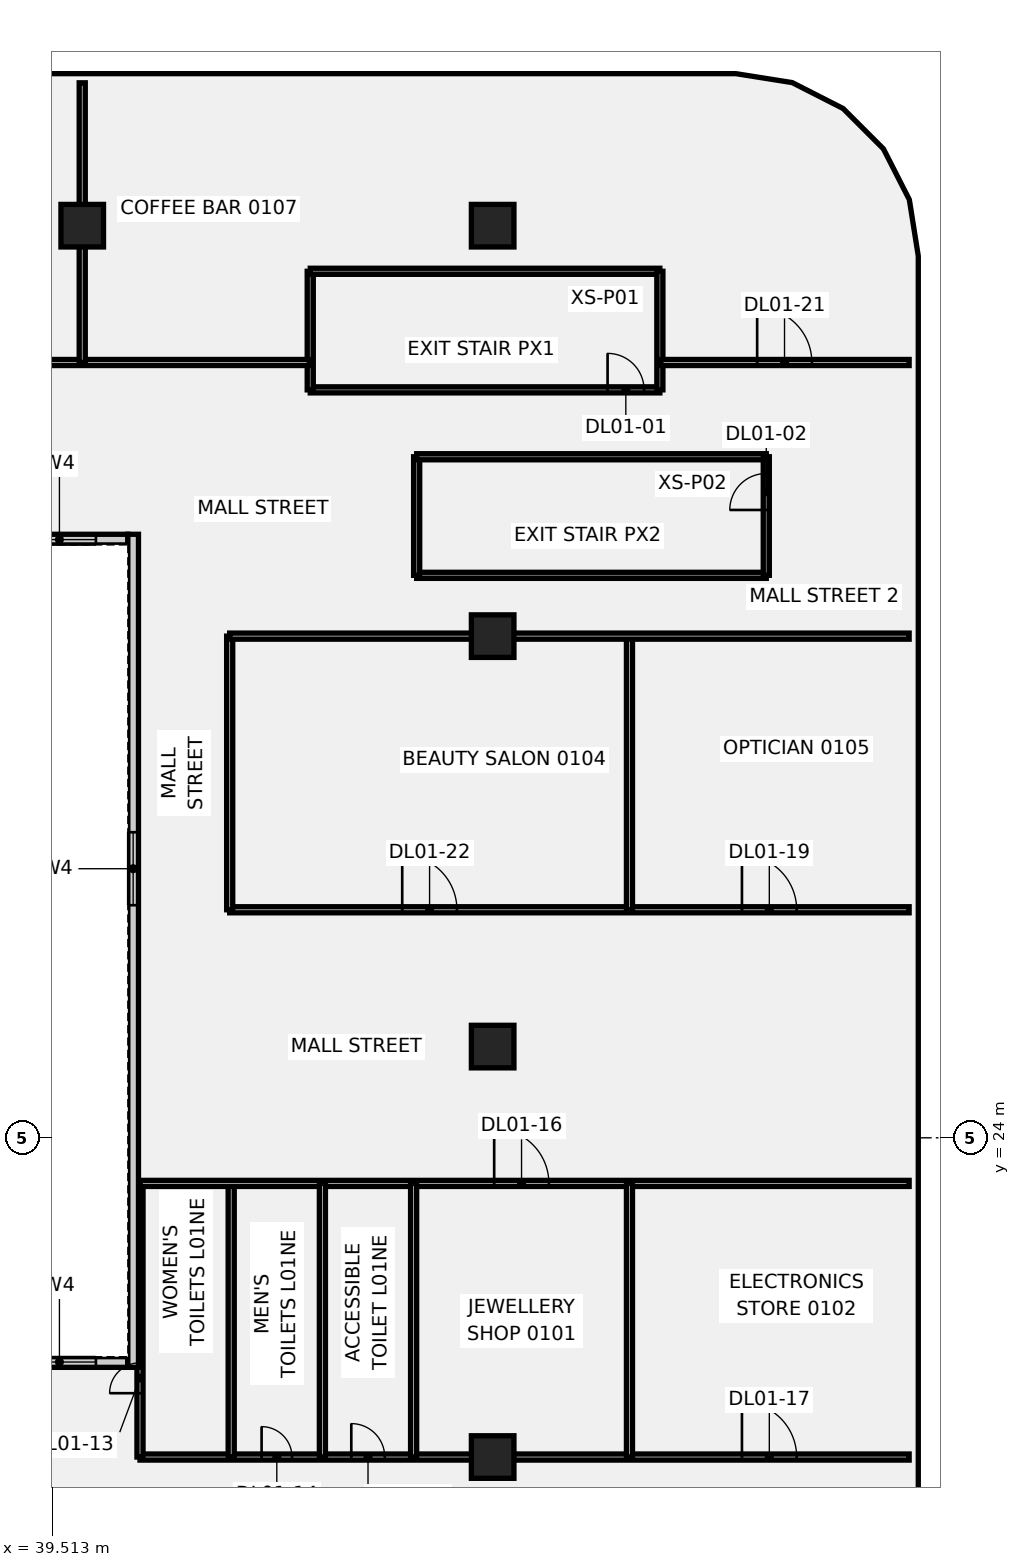
"""IFC4 building model, lengths in metres.
Left out: names, types, materials, properties, quantities, classifications, styles, units other than length and angle.
Written with IfcOpenShell. Run it as: python <this file> out.ifc"""

import sys

from ifc_helpers import new_model, si_unit, direction, frame, frame_2d, origin, origin_2d, place, context, subcontext, project, spatial, rectangle, extrude, element, fill, save


model = new_model("IFC4")
c1 = context("Model", 3, precision=1e-05, world=origin(), true_north=direction((0.0, 1.0)))
c2 = subcontext(c1, "Body", "Model", "MODEL_VIEW")
j1 = project(units=[si_unit("LENGTHUNIT", "METRE"), si_unit("PLANEANGLEUNIT", "RADIAN")], contexts=[c1])
p1 = place(None, origin())
s1 = spatial("IfcSite", under=j1, at=p1, CompositionType="ELEMENT")
p2 = place(p1, origin())
s2 = spatial("IfcBuilding", under=s1, at=p2, CompositionType="ELEMENT")
p3 = place(p2, frame((0.0, 0.0, 9.0)))
s3 = spatial("IfcBuildingStorey", under=s2, at=p3, CompositionType="ELEMENT", Elevation=9.0)
for number, where, z_axis, x_axis in (
    (1, (40.5, 54.0, -0.5), (0.0, 0.0, 1.0), (1.0, 0.0, 0.0)),
    (2, (54.0, 13.5, -0.5), (0.0, 0.0, 1.0), (1.0, 0.0, 0.0)),
    (3, (54.0, 27.0, -0.5), (0.0, 0.0, 1.0), (1.0, 0.0, 0.0)),
    (4, (54.0, 40.5, -0.5), (0.0, 0.0, 1.0), (1.0, 0.0, 0.0)),
    (5, (54.0, 54.0, -0.5), (0.0, 0.0, 1.0), (1.0, 0.0, 0.0)),
):
    element("IfcColumn", number, at=place(p3, frame(where, z_axis=z_axis, x_axis=x_axis)), inside=s3, PredefinedType="COLUMN", context=c2, shape_type="SweptSolid", body=[
        extrude(rectangle(XDim=1.4, YDim=1.4, at=origin_2d()), origin(), (0.0, 0.0, 1.0), 6.0),
    ])
p4 = place(p3, frame((48.0, 48.6, 0.0), z_axis=(0.0, 0.0, 1.0), x_axis=(1.0, 0.0, 0.0)))
e6 = element("IfcWall", 6, at=p4, inside=s3, PredefinedType="PARTITIONING", context=c2, shape_type="SweptSolid", body=[
    extrude(rectangle(XDim=11.5, YDim=0.2, at=frame_2d((5.75, 0.0))), origin(), (0.0, 0.0, 1.0), 5.5),
])
p5 = place(p4, frame((9.78, 0.0, 0.0)))
e7 = element("IfcOpeningElement", 7, at=p5, cuts=e6, PredefinedType="OPENING", context=c2, shape_type="SweptSolid", body=[
    extrude(rectangle(XDim=1.2, YDim=2.1, at=frame_2d((0.6, 1.05))), frame((0.0, 0.11, 0.0), z_axis=(0.0, -1.0, 0.0), x_axis=(1.0, 0.0, 0.0)), (0.0, 0.0, 1.0), 0.22),
])
p6 = place(p3, frame((48.0, 48.6, 0.0), z_axis=(0.0, 0.0, 1.0), x_axis=(0.0, 1.0, 0.0)))
e8 = element("IfcWall", 8, at=p6, inside=s3, PredefinedType="PARTITIONING", context=c2, shape_type="SweptSolid", body=[
    extrude(rectangle(XDim=3.9, YDim=0.2, at=frame_2d((1.95, 0.0))), origin(), (0.0, 0.0, 1.0), 5.5),
])
p7 = place(p3, frame((48.0, 52.5, 0.0), z_axis=(0.0, 0.0, 1.0), x_axis=(1.0, 0.0, 0.0)))
e9 = element("IfcWall", 9, at=p7, inside=s3, PredefinedType="PARTITIONING", context=c2, shape_type="SweptSolid", body=[
    extrude(rectangle(XDim=11.5, YDim=0.2, at=frame_2d((5.75, 0.0))), origin(), (0.0, 0.0, 1.0), 5.5),
])
p8 = place(p3, frame((59.5, 48.6, 0.0), z_axis=(0.0, 0.0, 1.0), x_axis=(0.0, 1.0, 0.0)))
e10 = element("IfcWall", 10, at=p8, inside=s3, PredefinedType="PARTITIONING", context=c2, shape_type="SweptSolid", body=[
    extrude(rectangle(XDim=3.9, YDim=0.2, at=frame_2d((1.95, 0.0))), origin(), (0.0, 0.0, 1.0), 5.5),
])
p9 = place(p3, frame((51.5, 42.5, 0.0), z_axis=(0.0, 0.0, 1.0), x_axis=(1.0, 0.0, 0.0)))
e11 = element("IfcWall", 11, at=p9, inside=s3, PredefinedType="PARTITIONING", context=c2, shape_type="SweptSolid", body=[
    extrude(rectangle(XDim=11.5, YDim=0.2, at=frame_2d((5.75, 0.0))), origin(), (0.0, 0.0, 1.0), 5.5),
])
p10 = place(p3, frame((51.5, 42.5, 0.0), z_axis=(0.0, 0.0, 1.0), x_axis=(0.0, 1.0, 0.0)))
e12 = element("IfcWall", 12, at=p10, inside=s3, PredefinedType="PARTITIONING", context=c2, shape_type="SweptSolid", body=[
    extrude(rectangle(XDim=3.9, YDim=0.2, at=frame_2d((1.95, 0.0))), origin(), (0.0, 0.0, 1.0), 5.5),
])
p11 = place(p3, frame((51.5, 46.4, 0.0), z_axis=(0.0, 0.0, 1.0), x_axis=(1.0, 0.0, 0.0)))
e13 = element("IfcWall", 13, at=p11, inside=s3, PredefinedType="PARTITIONING", context=c2, shape_type="SweptSolid", body=[
    extrude(rectangle(XDim=11.5, YDim=0.2, at=frame_2d((5.75, 0.0))), origin(), (0.0, 0.0, 1.0), 5.5),
])
p12 = place(p3, frame((63.0, 42.5, 0.0), z_axis=(0.0, 0.0, 1.0), x_axis=(0.0, 1.0, 0.0)))
e14 = element("IfcWall", 14, at=p12, inside=s3, PredefinedType="PARTITIONING", context=c2, shape_type="SweptSolid", body=[
    extrude(rectangle(XDim=3.9, YDim=0.2, at=frame_2d((1.95, 0.0))), origin(), (0.0, 0.0, 1.0), 5.5),
])
p13 = place(p12, frame((2.15, 0.0, 0.0)))
e15 = element("IfcOpeningElement", 15, at=p13, cuts=e14, PredefinedType="OPENING", context=c2, shape_type="SweptSolid", body=[
    extrude(rectangle(XDim=1.2, YDim=2.1, at=frame_2d((0.6, 1.05))), frame((0.0, 0.11, 0.0), z_axis=(0.0, -1.0, 0.0), x_axis=(1.0, 0.0, 0.0)), (0.0, 0.0, 1.0), 0.22),
])
p14 = place(p3, frame((19.53, 49.5, 0.0), z_axis=(0.0, 0.0, 1.0), x_axis=(1.0, 0.0, 0.0)))
e16 = element("IfcWall", 16, at=p14, inside=s3, PredefinedType="PARTITIONING", context=c2, shape_type="SweptSolid", body=[
    extrude(rectangle(XDim=28.44, YDim=0.2, at=frame_2d((14.22, 0.0))), origin(), (0.0, 0.0, 1.0), 5.5),
])
p15 = place(p14, frame((9.56, 0.0, 0.0)))
e17 = element("IfcOpeningElement", 17, at=p15, cuts=e16, PredefinedType="OPENING", context=c2, shape_type="SweptSolid", body=[
    extrude(rectangle(XDim=1.8, YDim=2.1, at=frame_2d((0.9, 1.05))), frame((0.0, 0.11, 0.0), z_axis=(0.0, -1.0, 0.0), x_axis=(1.0, 0.0, 0.0)), (0.0, 0.0, 1.0), 0.22),
])
p16 = place(p3, frame((40.5, 49.5, 0.0), z_axis=(0.0, 0.0, 1.0), x_axis=(0.0, 1.0, 0.0)))
e18 = element("IfcWall", 18, at=p16, inside=s3, PredefinedType="PARTITIONING", context=c2, shape_type="SweptSolid", body=[
    extrude(rectangle(XDim=9.199, YDim=0.2, at=frame_2d((4.6, 0.0))), origin(), (0.0, 0.0, 1.0), 5.5),
])
p17 = place(p3, frame((42.4, 13.5, 0.0), z_axis=(0.0, 0.0, 1.0), x_axis=(1.0, 0.0, 0.0)))
e19 = element("IfcWall", 19, at=p17, inside=s3, PredefinedType="PARTITIONING", context=c2, shape_type="SweptSolid", body=[
    extrude(rectangle(XDim=25.299, YDim=0.2, at=frame_2d((12.649, 0.0))), origin(), (0.0, 0.0, 1.0), 5.5),
])
p18 = place(p17, frame((4.0, 0.0, 0.0)))
e20 = element("IfcOpeningElement", 20, at=p18, cuts=e19, PredefinedType="OPENING", context=c2, shape_type="SweptSolid", body=[
    extrude(rectangle(XDim=1.0, YDim=2.1, at=frame_2d((0.5, 1.05))), frame((0.0, 0.11, 0.0), z_axis=(0.0, -1.0, 0.0), x_axis=(1.0, 0.0, 0.0)), (0.0, 0.0, 1.0), 0.22),
])
p19 = place(p17, frame((6.95, 0.0, 0.0)))
e21 = element("IfcOpeningElement", 21, at=p19, cuts=e19, PredefinedType="OPENING", context=c2, shape_type="SweptSolid", body=[
    extrude(rectangle(XDim=1.1, YDim=2.1, at=frame_2d((0.55, 1.05))), frame((0.0, 0.11, 0.0), z_axis=(0.0, -1.0, 0.0), x_axis=(1.0, 0.0, 0.0)), (0.0, 0.0, 1.0), 0.22),
])
p20 = place(p17, frame((19.8, 0.0, 0.0)))
e22 = element("IfcOpeningElement", 22, at=p20, cuts=e19, PredefinedType="OPENING", context=c2, shape_type="SweptSolid", body=[
    extrude(rectangle(XDim=1.8, YDim=2.1, at=frame_2d((0.9, 1.05))), frame((0.0, 0.11, 0.0), z_axis=(0.0, -1.0, 0.0), x_axis=(1.0, 0.0, 0.0)), (0.0, 0.0, 1.0), 0.22),
])
p21 = place(p3, frame((45.4, 13.5, 0.0), z_axis=(0.0, 0.0, 1.0), x_axis=(0.0, 1.0, 0.0)))
e23 = element("IfcWall", 23, at=p21, inside=s3, PredefinedType="PARTITIONING", context=c2, shape_type="SweptSolid", body=[
    extrude(rectangle(XDim=9.0, YDim=0.2, at=frame_2d((4.5, 0.0))), origin(), (0.0, 0.0, 1.0), 5.5),
])
p22 = place(p3, frame((42.4, 13.5, 0.0), z_axis=(0.0, 0.0, 1.0), x_axis=(0.0, 1.0, 0.0)))
e24 = element("IfcWall", 24, at=p22, inside=s3, PredefinedType="PARTITIONING", context=c2, shape_type="SweptSolid", body=[
    extrude(rectangle(XDim=9.0, YDim=0.2, at=frame_2d((4.5, 0.0))), origin(), (0.0, 0.0, 1.0), 5.5),
])
p23 = place(p22, frame((2.1, 0.0, 0.0)))
e25 = element("IfcOpeningElement", 25, at=p23, cuts=e24, PredefinedType="OPENING", context=c2, shape_type="SweptSolid", body=[
    extrude(rectangle(XDim=1.0, YDim=2.1, at=frame_2d((0.5, 1.05))), frame((0.0, 0.11, 0.0), z_axis=(0.0, -1.0, 0.0), x_axis=(1.0, 0.0, 0.0)), (0.0, 0.0, 1.0), 0.22),
])
p24 = place(p3, frame((42.4, 22.5, 0.0), z_axis=(0.0, 0.0, 1.0), x_axis=(1.0, 0.0, 0.0)))
e26 = element("IfcWall", 26, at=p24, inside=s3, PredefinedType="PARTITIONING", context=c2, shape_type="SweptSolid", body=[
    extrude(rectangle(XDim=25.299, YDim=0.2, at=frame_2d((12.649, 0.0))), origin(), (0.0, 0.0, 1.0), 5.5),
])
p25 = place(p24, frame((11.65, 0.0, 0.0)))
e27 = element("IfcOpeningElement", 27, at=p25, cuts=e26, PredefinedType="OPENING", context=c2, shape_type="SweptSolid", body=[
    extrude(rectangle(XDim=1.8, YDim=2.1, at=frame_2d((0.9, 1.05))), frame((0.0, 0.11, 0.0), z_axis=(0.0, -1.0, 0.0), x_axis=(1.0, 0.0, 0.0)), (0.0, 0.0, 1.0), 0.22),
])
for number, where, z_axis, x_axis in (
    (28, (48.4, 13.5, 0.0), (0.0, 0.0, 1.0), (0.0, 1.0, 0.0)),
    (29, (51.4, 13.5, 0.0), (0.0, 0.0, 1.0), (0.0, 1.0, 0.0)),
    (30, (58.5, 13.5, 0.0), (0.0, 0.0, 1.0), (0.0, 1.0, 0.0)),
):
    element("IfcWall", number, at=place(p3, frame(where, z_axis=z_axis, x_axis=x_axis)), inside=s3, PredefinedType="PARTITIONING", context=c2, shape_type="SweptSolid", body=[
        extrude(rectangle(XDim=9.0, YDim=0.2, at=frame_2d((4.5, 0.0))), origin(), (0.0, 0.0, 1.0), 5.5),
    ])
p26 = place(p3, frame((45.35, 31.5, 0.0), z_axis=(0.0, 0.0, 1.0), x_axis=(1.0, 0.0, 0.0)))
e31 = element("IfcWall", 31, at=p26, inside=s3, PredefinedType="PARTITIONING", context=c2, shape_type="SweptSolid", body=[
    extrude(rectangle(XDim=22.349, YDim=0.2, at=frame_2d((11.174, 0.0))), origin(), (0.0, 0.0, 1.0), 5.5),
])
p27 = place(p26, frame((16.85, 0.0, 0.0)))
e32 = element("IfcOpeningElement", 32, at=p27, cuts=e31, PredefinedType="OPENING", context=c2, shape_type="SweptSolid", body=[
    extrude(rectangle(XDim=1.8, YDim=2.1, at=frame_2d((0.9, 1.05))), frame((0.0, 0.11, 0.0), z_axis=(0.0, -1.0, 0.0), x_axis=(1.0, 0.0, 0.0)), (0.0, 0.0, 1.0), 0.22),
])
p28 = place(p26, frame((5.675, 0.0, 0.0)))
e33 = element("IfcOpeningElement", 33, at=p28, cuts=e31, PredefinedType="OPENING", context=c2, shape_type="SweptSolid", body=[
    extrude(rectangle(XDim=1.8, YDim=2.1, at=frame_2d((0.9, 1.05))), frame((0.0, 0.11, 0.0), z_axis=(0.0, -1.0, 0.0), x_axis=(1.0, 0.0, 0.0)), (0.0, 0.0, 1.0), 0.22),
])
for number, where, z_axis, x_axis in (
    (34, (58.5, 31.5, 0.0), (0.0, 0.0, 1.0), (0.0, 1.0, 0.0)),
    (35, (45.35, 31.5, 0.0), (0.0, 0.0, 1.0), (0.0, 1.0, 0.0)),
):
    element("IfcWall", number, at=place(p3, frame(where, z_axis=z_axis, x_axis=x_axis)), inside=s3, PredefinedType="PARTITIONING", context=c2, shape_type="SweptSolid", body=[
        extrude(rectangle(XDim=9.0, YDim=0.2, at=frame_2d((4.5, 0.0))), origin(), (0.0, 0.0, 1.0), 5.5),
    ])
p29 = place(p3, frame((45.35, 40.5, 0.0), z_axis=(0.0, 0.0, 1.0), x_axis=(1.0, 0.0, 0.0)))
e36 = element("IfcWall", 36, at=p29, inside=s3, PredefinedType="PARTITIONING", context=c2, shape_type="SweptSolid", body=[
    extrude(rectangle(XDim=22.349, YDim=0.2, at=frame_2d((11.174, 0.0))), origin(), (0.0, 0.0, 1.0), 5.5),
])
p30 = place(p3, frame((59.53, 49.5, 0.0), z_axis=(0.0, 0.0, 1.0), x_axis=(1.0, 0.0, 0.0)))
e37 = element("IfcWall", 37, at=p30, inside=s3, PredefinedType="PARTITIONING", context=c2, shape_type="SweptSolid", body=[
    extrude(rectangle(XDim=8.169, YDim=0.2, at=frame_2d((4.084, 0.0))), origin(), (0.0, 0.0, 1.0), 5.5),
])
p31 = place(p30, frame((3.17, 0.0, 0.0)))
e38 = element("IfcOpeningElement", 38, at=p31, cuts=e37, PredefinedType="OPENING", context=c2, shape_type="SweptSolid", body=[
    extrude(rectangle(XDim=1.8, YDim=2.1, at=frame_2d((0.9, 1.05))), frame((0.0, 0.11, 0.0), z_axis=(0.0, -1.0, 0.0), x_axis=(1.0, 0.0, 0.0)), (0.0, 0.0, 1.0), 0.22),
])
p32 = place(p3, frame((24.0, 16.625, 0.0), z_axis=(0.0, 0.0, 1.0), x_axis=(1.0, 0.0, 0.0)))
e39 = element("IfcWall", 39, at=p32, inside=s3, PredefinedType="SOLIDWALL", context=c2, shape_type="SweptSolid", body=[
    extrude(rectangle(XDim=18.0, YDim=0.35, at=frame_2d((9.0, 0.0))), origin(), (0.0, 0.0, 1.0), 5.5),
])
p33 = place(p32, frame((14.55, 0.0, 1.0)))
e40 = element("IfcOpeningElement", 40, at=p33, cuts=e39, PredefinedType="OPENING", context=c2, shape_type="SweptSolid", body=[
    extrude(rectangle(XDim=2.4, YDim=1.8, at=frame_2d((1.2, 0.9))), frame((0.0, 0.185, 0.0), z_axis=(0.0, -1.0, 0.0), x_axis=(1.0, 0.0, 0.0)), (0.0, 0.0, 1.0), 0.37),
])
p34 = place(p3, frame((24.0, 43.675, 0.0), z_axis=(0.0, 0.0, 1.0), x_axis=(1.0, 0.0, 0.0)))
e41 = element("IfcWall", 41, at=p34, inside=s3, PredefinedType="SOLIDWALL", context=c2, shape_type="SweptSolid", body=[
    extrude(rectangle(XDim=18.0, YDim=0.35, at=frame_2d((9.0, 0.0))), origin(), (0.0, 0.0, 1.0), 5.5),
])
p35 = place(p34, frame((14.55, 0.0, 1.0)))
e42 = element("IfcOpeningElement", 42, at=p35, cuts=e41, PredefinedType="OPENING", context=c2, shape_type="SweptSolid", body=[
    extrude(rectangle(XDim=2.4, YDim=1.8, at=frame_2d((1.2, 0.9))), frame((0.0, 0.185, 0.0), z_axis=(0.0, -1.0, 0.0), x_axis=(1.0, 0.0, 0.0)), (0.0, 0.0, 1.0), 0.37),
])
p36 = place(p3, frame((42.175, 16.45, 0.0), z_axis=(0.0, 0.0, 1.0), x_axis=(0.0, 1.0, 0.0)))
e43 = element("IfcWall", 43, at=p36, inside=s3, PredefinedType="SOLIDWALL", context=c2, shape_type="SweptSolid", body=[
    extrude(rectangle(XDim=27.4, YDim=0.35, at=frame_2d((13.7, 0.0))), origin(), (0.0, 0.0, 1.0), 5.5),
])
p37 = place(p36, frame((15.2, 0.0, 1.0)))
e44 = element("IfcOpeningElement", 44, at=p37, cuts=e43, PredefinedType="OPENING", context=c2, shape_type="SweptSolid", body=[
    extrude(rectangle(XDim=2.4, YDim=1.8, at=frame_2d((1.2, 0.9))), frame((0.0, 0.185, 0.0), z_axis=(0.0, -1.0, 0.0), x_axis=(1.0, 0.0, 0.0)), (0.0, 0.0, 1.0), 0.37),
])
p38 = place(p5, origin())
e45 = element("IfcDoor", 45, at=p38, inside=s3, OperationType="SINGLE_SWING_LEFT", PredefinedType="DOOR", context=c2, shape_type="SweptSolid", body=[
    extrude(rectangle(XDim=1.2, YDim=2.1, at=frame_2d((0.6, 1.05))), frame((0.0, 0.025, 0.0), z_axis=(0.0, -1.0, 0.0), x_axis=(1.0, 0.0, 0.0)), (0.0, 0.0, 1.0), 0.05),
])
fill(e7, e45)
p39 = place(p13, origin())
e46 = element("IfcDoor", 46, at=p39, inside=s3, OperationType="SINGLE_SWING_RIGHT", PredefinedType="DOOR", context=c2, shape_type="SweptSolid", body=[
    extrude(rectangle(XDim=1.2, YDim=2.1, at=frame_2d((0.6, 1.05))), frame((0.0, 0.025, 0.0), z_axis=(0.0, -1.0, 0.0), x_axis=(1.0, 0.0, 0.0)), (0.0, 0.0, 1.0), 0.05),
])
fill(e15, e46)
p40 = place(p23, origin())
e47 = element("IfcDoor", 47, at=p40, inside=s3, OperationType="SINGLE_SWING_LEFT", PredefinedType="DOOR", context=c2, shape_type="SweptSolid", body=[
    extrude(rectangle(XDim=1.0, YDim=2.1, at=frame_2d((0.5, 1.05))), frame((0.0, 0.025, 0.0), z_axis=(0.0, -1.0, 0.0), x_axis=(1.0, 0.0, 0.0)), (0.0, 0.0, 1.0), 0.05),
])
fill(e25, e47)
p41 = place(p18, origin())
e48 = element("IfcDoor", 48, at=p41, inside=s3, OperationType="SINGLE_SWING_RIGHT", PredefinedType="DOOR", context=c2, shape_type="SweptSolid", body=[
    extrude(rectangle(XDim=1.0, YDim=2.1, at=frame_2d((0.5, 1.05))), frame((0.0, 0.025, 0.0), z_axis=(0.0, -1.0, 0.0), x_axis=(1.0, 0.0, 0.0)), (0.0, 0.0, 1.0), 0.05),
])
fill(e20, e48)
p42 = place(p19, origin())
e49 = element("IfcDoor", 49, at=p42, inside=s3, OperationType="SINGLE_SWING_LEFT", PredefinedType="DOOR", context=c2, shape_type="SweptSolid", body=[
    extrude(rectangle(XDim=1.1, YDim=2.1, at=frame_2d((0.55, 1.05))), frame((0.0, 0.025, 0.0), z_axis=(0.0, -1.0, 0.0), x_axis=(1.0, 0.0, 0.0)), (0.0, 0.0, 1.0), 0.05),
])
fill(e21, e49)
p43 = place(p25, origin())
e50 = element("IfcDoor", 50, at=p43, inside=s3, OperationType="SINGLE_SWING_RIGHT", PredefinedType="DOOR", context=c2, shape_type="SweptSolid", body=[
    extrude(rectangle(XDim=1.8, YDim=2.1, at=frame_2d((0.9, 1.05))), frame((0.0, 0.025, 0.0), z_axis=(0.0, -1.0, 0.0), x_axis=(1.0, 0.0, 0.0)), (0.0, 0.0, 1.0), 0.05),
])
fill(e27, e50)
p44 = place(p20, origin())
e51 = element("IfcDoor", 51, at=p44, inside=s3, OperationType="SINGLE_SWING_LEFT", PredefinedType="DOOR", context=c2, shape_type="SweptSolid", body=[
    extrude(rectangle(XDim=1.8, YDim=2.1, at=frame_2d((0.9, 1.05))), frame((0.0, 0.025, 0.0), z_axis=(0.0, -1.0, 0.0), x_axis=(1.0, 0.0, 0.0)), (0.0, 0.0, 1.0), 0.05),
])
fill(e22, e51)
p45 = place(p27, origin())
e52 = element("IfcDoor", 52, at=p45, inside=s3, OperationType="SINGLE_SWING_LEFT", PredefinedType="DOOR", context=c2, shape_type="SweptSolid", body=[
    extrude(rectangle(XDim=1.8, YDim=2.1, at=frame_2d((0.9, 1.05))), frame((0.0, 0.025, 0.0), z_axis=(0.0, -1.0, 0.0), x_axis=(1.0, 0.0, 0.0)), (0.0, 0.0, 1.0), 0.05),
])
fill(e32, e52)
p46 = place(p31, origin())
e53 = element("IfcDoor", 53, at=p46, inside=s3, OperationType="SINGLE_SWING_LEFT", PredefinedType="DOOR", context=c2, shape_type="SweptSolid", body=[
    extrude(rectangle(XDim=1.8, YDim=2.1, at=frame_2d((0.9, 1.05))), frame((0.0, 0.025, 0.0), z_axis=(0.0, -1.0, 0.0), x_axis=(1.0, 0.0, 0.0)), (0.0, 0.0, 1.0), 0.05),
])
fill(e38, e53)
p47 = place(p28, origin())
e54 = element("IfcDoor", 54, at=p47, inside=s3, OperationType="SINGLE_SWING_RIGHT", PredefinedType="DOOR", context=c2, shape_type="SweptSolid", body=[
    extrude(rectangle(XDim=1.8, YDim=2.1, at=frame_2d((0.9, 1.05))), frame((0.0, 0.025, 0.0), z_axis=(0.0, -1.0, 0.0), x_axis=(1.0, 0.0, 0.0)), (0.0, 0.0, 1.0), 0.05),
])
fill(e33, e54)
p48 = place(p33, origin())
e55 = element("IfcWindow", 55, at=p48, inside=s3, PartitioningType="SINGLE_PANEL", PredefinedType="WINDOW", context=c2, shape_type="SweptSolid", body=[
    extrude(rectangle(XDim=2.4, YDim=1.8, at=frame_2d((1.2, 0.9))), frame((0.0, 0.03, 0.0), z_axis=(0.0, -1.0, 0.0), x_axis=(1.0, 0.0, 0.0)), (0.0, 0.0, 1.0), 0.06),
])
fill(e40, e55)
p49 = place(p35, origin())
e56 = element("IfcWindow", 56, at=p49, inside=s3, PartitioningType="SINGLE_PANEL", PredefinedType="WINDOW", context=c2, shape_type="SweptSolid", body=[
    extrude(rectangle(XDim=2.4, YDim=1.8, at=frame_2d((1.2, 0.9))), frame((0.0, 0.03, 0.0), z_axis=(0.0, -1.0, 0.0), x_axis=(1.0, 0.0, 0.0)), (0.0, 0.0, 1.0), 0.06),
])
fill(e42, e56)
p50 = place(p37, origin())
e57 = element("IfcWindow", 57, at=p50, inside=s3, PartitioningType="SINGLE_PANEL", PredefinedType="WINDOW", context=c2, shape_type="SweptSolid", body=[
    extrude(rectangle(XDim=2.4, YDim=1.8, at=frame_2d((1.2, 0.9))), frame((0.0, 0.03, 0.0), z_axis=(0.0, -1.0, 0.0), x_axis=(1.0, 0.0, 0.0)), (0.0, 0.0, 1.0), 0.06),
])
fill(e44, e57)
save(model, sys.argv[1])
